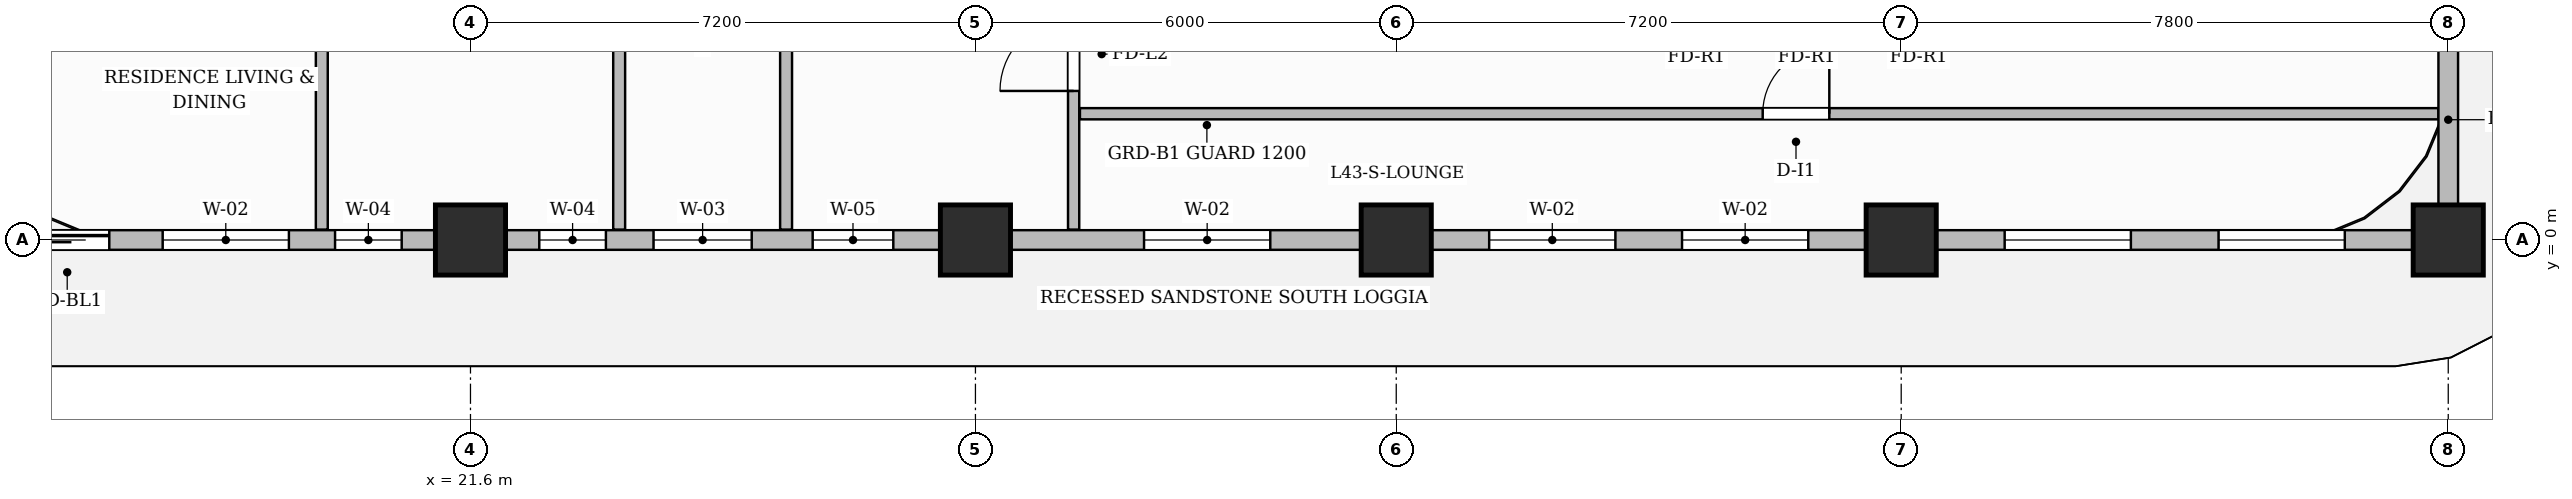
"""IFC4 building model, lengths in metres.
Left out: names, types, materials, properties, quantities, classifications, styles, units other than length and angle.
Written with IfcOpenShell. Run it as: python <this file> out.ifc"""

import sys

from ifc_helpers import new_model, si_unit, direction, frame, frame_2d, origin, origin_2d, place, context, subcontext, project, spatial, rectangle, extrude, source, transform, mapped, element, fill, save


model = new_model("IFC4")
c1 = context("Model", 3, precision=1e-05, world=origin(), true_north=direction((0.0, 1.0)))
c2 = subcontext(c1, "Body", "Model", "MODEL_VIEW")
j1 = project(units=[si_unit("LENGTHUNIT", "METRE"), si_unit("PLANEANGLEUNIT", "RADIAN")], contexts=[c1])
p1 = place(None, origin())
s1 = spatial("IfcSite", under=j1, at=p1, CompositionType="ELEMENT")
p2 = place(p1, origin())
s2 = spatial("IfcBuilding", under=s1, at=p2, CompositionType="ELEMENT")
p3 = place(p2, frame((0.0, 0.0, 173.4)))
s3 = spatial("IfcBuildingStorey", under=s2, at=p3, CompositionType="ELEMENT", Elevation=173.4)
m1 = source(origin(), c2, "Body", "SweptSolid", [
    extrude(rectangle(XDim=1.0, YDim=1.0, at=origin_2d()), origin(), (0.0, 0.0, 1.0), 3.85),
])
for number, where, z_axis, x_axis in (
    (1, (21.6, 0.0, 0.0), (0.0, 0.0, 1.0), (1.0, 0.0, 0.0)),
    (2, (28.8, 0.0, 0.0), (0.0, 0.0, 1.0), (1.0, 0.0, 0.0)),
    (3, (34.8, 0.0, 0.0), (0.0, 0.0, 1.0), (1.0, 0.0, 0.0)),
    (4, (42.0, 0.0, 0.0), (0.0, 0.0, 1.0), (1.0, 0.0, 0.0)),
    (5, (49.8, 0.0, 0.0), (0.0, 0.0, 1.0), (1.0, 0.0, 0.0)),
):
    element("IfcColumn", number, at=place(p3, frame(where, z_axis=z_axis, x_axis=x_axis)), inside=s3, PredefinedType="COLUMN", context=c2, shape_type="MappedRepresentation", body=[
        mapped(m1, transform((0.0, 0.0, 0.0), scale=1.0)),
    ])
p4 = place(p3, frame((30.2, 0.148, 0.0), z_axis=(0.0, 0.0, 1.0), x_axis=(0.0, 1.0, 0.0)))
e6 = element("IfcWall", 6, at=p4, inside=s3, PredefinedType="PARTITIONING", context=c2, shape_type="SweptSolid", body=[
    extrude(rectangle(XDim=9.512, YDim=0.16, at=frame_2d((4.756, 0.0))), origin(), (0.0, 0.0, 1.0), 3.6),
])
p5 = place(p4, frame((1.977, 0.0, 0.0)))
e7 = element("IfcOpeningElement", 7, at=p5, cuts=e6, PredefinedType="OPENING", context=c2, shape_type="SweptSolid", body=[
    extrude(rectangle(XDim=1.05, YDim=2.15, at=frame_2d((0.525, 1.075))), frame((0.0, 0.09, 0.0), z_axis=(0.0, -1.0, 0.0), x_axis=(1.0, 0.0, 0.0)), (0.0, 0.0, 1.0), 0.18),
])
p6 = place(p3, frame((30.29, 1.8, 0.0), z_axis=(0.0, 0.0, 1.0), x_axis=(1.0, 0.0, 0.0)))
e8 = element("IfcWall", 8, at=p6, inside=s3, PredefinedType="PARTITIONING", context=c2, shape_type="SweptSolid", body=[
    extrude(rectangle(XDim=19.37, YDim=0.16, at=frame_2d((9.685, 0.0))), origin(), (0.0, 0.0, 1.0), 3.6),
])
p7 = place(p6, frame((9.735, 0.0, 0.0)))
e9 = element("IfcOpeningElement", 9, at=p7, cuts=e8, PredefinedType="OPENING", context=c2, shape_type="SweptSolid", body=[
    extrude(rectangle(XDim=0.95, YDim=2.15, at=frame_2d((0.475, 1.075))), frame((0.0, 0.09, 0.0), z_axis=(0.0, -1.0, 0.0), x_axis=(1.0, 0.0, 0.0)), (0.0, 0.0, 1.0), 0.18),
])
p8 = place(p3, frame((19.48, 0.148, 0.0), z_axis=(0.0, 0.0, 1.0), x_axis=(0.0, 1.0, 0.0)))
e10 = element("IfcWall", 10, at=p8, inside=s3, PredefinedType="PARTITIONING", context=c2, shape_type="SweptSolid", body=[
    extrude(rectangle(XDim=9.512, YDim=0.17, at=frame_2d((4.756, 0.0))), origin(), (0.0, 0.0, 1.0), 3.6),
])
p9 = place(p8, frame((8.052, 0.0, 0.0)))
e11 = element("IfcOpeningElement", 11, at=p9, cuts=e10, PredefinedType="OPENING", context=c2, shape_type="SweptSolid", body=[
    extrude(rectangle(XDim=0.95, YDim=2.15, at=frame_2d((0.475, 1.075))), frame((0.0, 0.095, 0.0), z_axis=(0.0, -1.0, 0.0), x_axis=(1.0, 0.0, 0.0)), (0.0, 0.0, 1.0), 0.19),
])
for number, where, z_axis, x_axis in (
    (12, (23.72, 0.148, 0.0), (0.0, 0.0, 1.0), (0.0, 1.0, 0.0)),
    (13, (26.1, 0.148, 0.0), (0.0, 0.0, 1.0), (0.0, 1.0, 0.0)),
):
    element("IfcWall", number, at=place(p3, frame(where, z_axis=z_axis, x_axis=x_axis)), inside=s3, PredefinedType="PARTITIONING", context=c2, shape_type="SweptSolid", body=[
        extrude(rectangle(XDim=7.362, YDim=0.17, at=frame_2d((3.681, 0.0))), origin(), (0.0, 0.0, 1.0), 3.6),
    ])
p10 = place(p3, frame((14.4, 0.0, 0.0), z_axis=(0.0, 0.0, 1.0), x_axis=(1.0, 0.0, 0.0)))
e14 = element("IfcWall", 14, at=p10, inside=s3, PredefinedType="SOLIDWALL", context=c2, shape_type="SweptSolid", body=[
    extrude(rectangle(XDim=35.4, YDim=0.28, at=frame_2d((17.7, 0.0))), origin(), (0.0, 0.0, 1.0), 3.085),
])
p11 = place(p10, frame((0.85, 0.0, 0.0)))
e15 = element("IfcOpeningElement", 15, at=p11, cuts=e14, PredefinedType="OPENING", context=c2, shape_type="SweptSolid", body=[
    extrude(rectangle(XDim=1.2, YDim=2.2, at=frame_2d((0.6, 1.1))), frame((0.0, 0.15, 0.0), z_axis=(0.0, -1.0, 0.0), x_axis=(1.0, 0.0, 0.0)), (0.0, 0.0, 1.0), 0.3),
])
p12 = place(p10, frame((2.811, 0.0, 0.8)))
e16 = element("IfcOpeningElement", 16, at=p12, cuts=e14, PredefinedType="OPENING", context=c2, shape_type="SweptSolid", body=[
    extrude(rectangle(XDim=1.8, YDim=1.85, at=frame_2d((0.9, 0.925))), frame((0.0, 0.15, 0.0), z_axis=(0.0, -1.0, 0.0), x_axis=(1.0, 0.0, 0.0)), (0.0, 0.0, 1.0), 0.3),
])
p13 = place(p10, frame((5.269, 0.0, 0.8)))
e17 = element("IfcOpeningElement", 17, at=p13, cuts=e14, PredefinedType="OPENING", context=c2, shape_type="SweptSolid", body=[
    extrude(rectangle(XDim=0.95, YDim=1.75, at=frame_2d((0.475, 0.875))), frame((0.0, 0.15, 0.0), z_axis=(0.0, -1.0, 0.0), x_axis=(1.0, 0.0, 0.0)), (0.0, 0.0, 1.0), 0.3),
])
p14 = place(p10, frame((8.181, 0.0, 0.8)))
e18 = element("IfcOpeningElement", 18, at=p14, cuts=e14, PredefinedType="OPENING", context=c2, shape_type="SweptSolid", body=[
    extrude(rectangle(XDim=0.95, YDim=1.75, at=frame_2d((0.475, 0.875))), frame((0.0, 0.15, 0.0), z_axis=(0.0, -1.0, 0.0), x_axis=(1.0, 0.0, 0.0)), (0.0, 0.0, 1.0), 0.3),
])
p15 = place(p10, frame((9.81, 0.0, 0.8)))
e19 = element("IfcOpeningElement", 19, at=p15, cuts=e14, PredefinedType="OPENING", context=c2, shape_type="SweptSolid", body=[
    extrude(rectangle(XDim=1.4, YDim=1.85, at=frame_2d((0.7, 0.925))), frame((0.0, 0.15, 0.0), z_axis=(0.0, -1.0, 0.0), x_axis=(1.0, 0.0, 0.0)), (0.0, 0.0, 1.0), 0.3),
])
p16 = place(p10, frame((12.079, 0.0, 0.8)))
e20 = element("IfcOpeningElement", 20, at=p16, cuts=e14, PredefinedType="OPENING", context=c2, shape_type="SweptSolid", body=[
    extrude(rectangle(XDim=1.15, YDim=1.8, at=frame_2d((0.575, 0.9))), frame((0.0, 0.15, 0.0), z_axis=(0.0, -1.0, 0.0), x_axis=(1.0, 0.0, 0.0)), (0.0, 0.0, 1.0), 0.3),
])
p17 = place(p10, frame((16.804, 0.0, 0.8)))
e21 = element("IfcOpeningElement", 21, at=p17, cuts=e14, PredefinedType="OPENING", context=c2, shape_type="SweptSolid", body=[
    extrude(rectangle(XDim=1.8, YDim=1.85, at=frame_2d((0.9, 0.925))), frame((0.0, 0.15, 0.0), z_axis=(0.0, -1.0, 0.0), x_axis=(1.0, 0.0, 0.0)), (0.0, 0.0, 1.0), 0.3),
])
p18 = place(p10, frame((21.725, 0.0, 0.8)))
e22 = element("IfcOpeningElement", 22, at=p18, cuts=e14, PredefinedType="OPENING", context=c2, shape_type="SweptSolid", body=[
    extrude(rectangle(XDim=1.8, YDim=1.85, at=frame_2d((0.9, 0.925))), frame((0.0, 0.15, 0.0), z_axis=(0.0, -1.0, 0.0), x_axis=(1.0, 0.0, 0.0)), (0.0, 0.0, 1.0), 0.3),
])
p19 = place(p10, frame((24.475, 0.0, 0.8)))
e23 = element("IfcOpeningElement", 23, at=p19, cuts=e14, PredefinedType="OPENING", context=c2, shape_type="SweptSolid", body=[
    extrude(rectangle(XDim=1.8, YDim=1.85, at=frame_2d((0.9, 0.925))), frame((0.0, 0.15, 0.0), z_axis=(0.0, -1.0, 0.0), x_axis=(1.0, 0.0, 0.0)), (0.0, 0.0, 1.0), 0.3),
])
p20 = place(p10, frame((29.075, 0.0, 0.8)))
e24 = element("IfcOpeningElement", 24, at=p20, cuts=e14, PredefinedType="OPENING", context=c2, shape_type="SweptSolid", body=[
    extrude(rectangle(XDim=1.8, YDim=1.85, at=frame_2d((0.9, 0.925))), frame((0.0, 0.15, 0.0), z_axis=(0.0, -1.0, 0.0), x_axis=(1.0, 0.0, 0.0)), (0.0, 0.0, 1.0), 0.3),
])
p21 = place(p10, frame((32.125, 0.0, 0.8)))
e25 = element("IfcOpeningElement", 25, at=p21, cuts=e14, PredefinedType="OPENING", context=c2, shape_type="SweptSolid", body=[
    extrude(rectangle(XDim=1.8, YDim=1.85, at=frame_2d((0.9, 0.925))), frame((0.0, 0.15, 0.0), z_axis=(0.0, -1.0, 0.0), x_axis=(1.0, 0.0, 0.0)), (0.0, 0.0, 1.0), 0.3),
])
p22 = place(p3, frame((49.8, 0.05, 0.0), z_axis=(0.0, 0.0, 1.0), x_axis=(0.0, 1.0, 0.0)))
e26 = element("IfcWall", 26, at=p22, inside=s3, PredefinedType="SOLIDWALL", context=c2, shape_type="SweptSolid", body=[
    extrude(rectangle(XDim=3.33, YDim=0.28, at=frame_2d((1.665, 0.0))), origin(), (0.0, 0.0, 1.0), 3.6),
])
m2 = source(origin(), c2, "Body", "SweptSolid", [
    extrude(rectangle(XDim=1.05, YDim=2.15, at=frame_2d((0.525, 1.075))), frame((0.0, 0.025, 0.0), z_axis=(0.0, -1.0, 0.0), x_axis=(1.0, 0.0, 0.0)), (0.0, 0.0, 1.0), 0.05),
])
p23 = place(p5, origin())
e27 = element("IfcDoor", 27, at=p23, inside=s3, OperationType="SINGLE_SWING_LEFT", PredefinedType="DOOR", context=c2, shape_type="MappedRepresentation", body=[
    mapped(m2, transform((0.0, 0.0, 0.0), scale=1.0)),
])
fill(e7, e27)
m3 = source(origin(), c2, "Body", "SweptSolid", [
    extrude(rectangle(XDim=0.95, YDim=2.15, at=frame_2d((0.475, 1.075))), frame((0.0, 0.025, 0.0), z_axis=(0.0, -1.0, 0.0), x_axis=(1.0, 0.0, 0.0)), (0.0, 0.0, 1.0), 0.05),
])
p24 = place(p7, origin())
e28 = element("IfcDoor", 28, at=p24, inside=s3, OperationType="SINGLE_SWING_RIGHT", PredefinedType="DOOR", context=c2, shape_type="MappedRepresentation", body=[
    mapped(m3, transform((0.0, 0.0, 0.0), scale=1.0)),
])
fill(e9, e28)
m4 = source(origin(), c2, "Body", "SweptSolid", [
    extrude(rectangle(XDim=1.2, YDim=2.2, at=frame_2d((0.6, 1.1))), frame((0.0, 0.025, 0.0), z_axis=(0.0, -1.0, 0.0), x_axis=(1.0, 0.0, 0.0)), (0.0, 0.0, 1.0), 0.05),
])
p25 = place(p11, origin())
e29 = element("IfcDoor", 29, at=p25, inside=s3, OperationType="SLIDING_TO_LEFT", PredefinedType="DOOR", context=c2, shape_type="MappedRepresentation", body=[
    mapped(m4, transform((0.0, 0.0, 0.0), scale=1.0)),
])
fill(e15, e29)
m5 = source(origin(), c2, "Body", "SweptSolid", [
    extrude(rectangle(XDim=1.8, YDim=1.85, at=frame_2d((0.9, 0.925))), frame((0.0, 0.03, 0.0), z_axis=(0.0, -1.0, 0.0), x_axis=(1.0, 0.0, 0.0)), (0.0, 0.0, 1.0), 0.06),
])
p26 = place(p12, origin())
e30 = element("IfcWindow", 30, at=p26, inside=s3, PartitioningType="DOUBLE_PANEL_VERTICAL", PredefinedType="WINDOW", context=c2, shape_type="MappedRepresentation", body=[
    mapped(m5, transform((0.0, 0.0, 0.0), scale=1.0)),
])
fill(e16, e30)
m6 = source(origin(), c2, "Body", "SweptSolid", [
    extrude(rectangle(XDim=0.95, YDim=1.75, at=frame_2d((0.475, 0.875))), frame((0.0, 0.03, 0.0), z_axis=(0.0, -1.0, 0.0), x_axis=(1.0, 0.0, 0.0)), (0.0, 0.0, 1.0), 0.06),
])
p27 = place(p13, origin())
e31 = element("IfcWindow", 31, at=p27, inside=s3, PartitioningType="SINGLE_PANEL", PredefinedType="WINDOW", context=c2, shape_type="MappedRepresentation", body=[
    mapped(m6, transform((0.0, 0.0, 0.0), scale=1.0)),
])
fill(e17, e31)
p28 = place(p14, origin())
e32 = element("IfcWindow", 32, at=p28, inside=s3, PartitioningType="SINGLE_PANEL", PredefinedType="WINDOW", context=c2, shape_type="MappedRepresentation", body=[
    mapped(m6, transform((0.0, 0.0, 0.0), scale=1.0)),
])
fill(e18, e32)
m7 = source(origin(), c2, "Body", "SweptSolid", [
    extrude(rectangle(XDim=1.4, YDim=1.85, at=frame_2d((0.7, 0.925))), frame((0.0, 0.03, 0.0), z_axis=(0.0, -1.0, 0.0), x_axis=(1.0, 0.0, 0.0)), (0.0, 0.0, 1.0), 0.06),
])
p29 = place(p15, origin())
e33 = element("IfcWindow", 33, at=p29, inside=s3, PartitioningType="SINGLE_PANEL", PredefinedType="WINDOW", context=c2, shape_type="MappedRepresentation", body=[
    mapped(m7, transform((0.0, 0.0, 0.0), scale=1.0)),
])
fill(e19, e33)
m8 = source(origin(), c2, "Body", "SweptSolid", [
    extrude(rectangle(XDim=1.15, YDim=1.8, at=frame_2d((0.575, 0.9))), frame((0.0, 0.03, 0.0), z_axis=(0.0, -1.0, 0.0), x_axis=(1.0, 0.0, 0.0)), (0.0, 0.0, 1.0), 0.06),
])
p30 = place(p16, origin())
e34 = element("IfcWindow", 34, at=p30, inside=s3, PartitioningType="SINGLE_PANEL", PredefinedType="WINDOW", context=c2, shape_type="MappedRepresentation", body=[
    mapped(m8, transform((0.0, 0.0, 0.0), scale=1.0)),
])
fill(e20, e34)
p31 = place(p17, origin())
e35 = element("IfcWindow", 35, at=p31, inside=s3, PartitioningType="DOUBLE_PANEL_VERTICAL", PredefinedType="WINDOW", context=c2, shape_type="MappedRepresentation", body=[
    mapped(m5, transform((0.0, 0.0, 0.0), scale=1.0)),
])
fill(e21, e35)
p32 = place(p18, origin())
e36 = element("IfcWindow", 36, at=p32, inside=s3, PartitioningType="DOUBLE_PANEL_VERTICAL", PredefinedType="WINDOW", context=c2, shape_type="MappedRepresentation", body=[
    mapped(m5, transform((0.0, 0.0, 0.0), scale=1.0)),
])
fill(e22, e36)
p33 = place(p19, origin())
e37 = element("IfcWindow", 37, at=p33, inside=s3, PartitioningType="DOUBLE_PANEL_VERTICAL", PredefinedType="WINDOW", context=c2, shape_type="MappedRepresentation", body=[
    mapped(m5, transform((0.0, 0.0, 0.0), scale=1.0)),
])
fill(e23, e37)
p34 = place(p20, origin())
e38 = element("IfcWindow", 38, at=p34, inside=s3, PartitioningType="DOUBLE_PANEL_VERTICAL", PredefinedType="WINDOW", context=c2, shape_type="MappedRepresentation", body=[
    mapped(m5, transform((0.0, 0.0, 0.0), scale=1.0)),
])
fill(e24, e38)
p35 = place(p21, origin())
e39 = element("IfcWindow", 39, at=p35, inside=s3, PartitioningType="DOUBLE_PANEL_VERTICAL", PredefinedType="WINDOW", context=c2, shape_type="MappedRepresentation", body=[
    mapped(m5, transform((0.0, 0.0, 0.0), scale=1.0)),
])
fill(e25, e39)
save(model, sys.argv[1])
